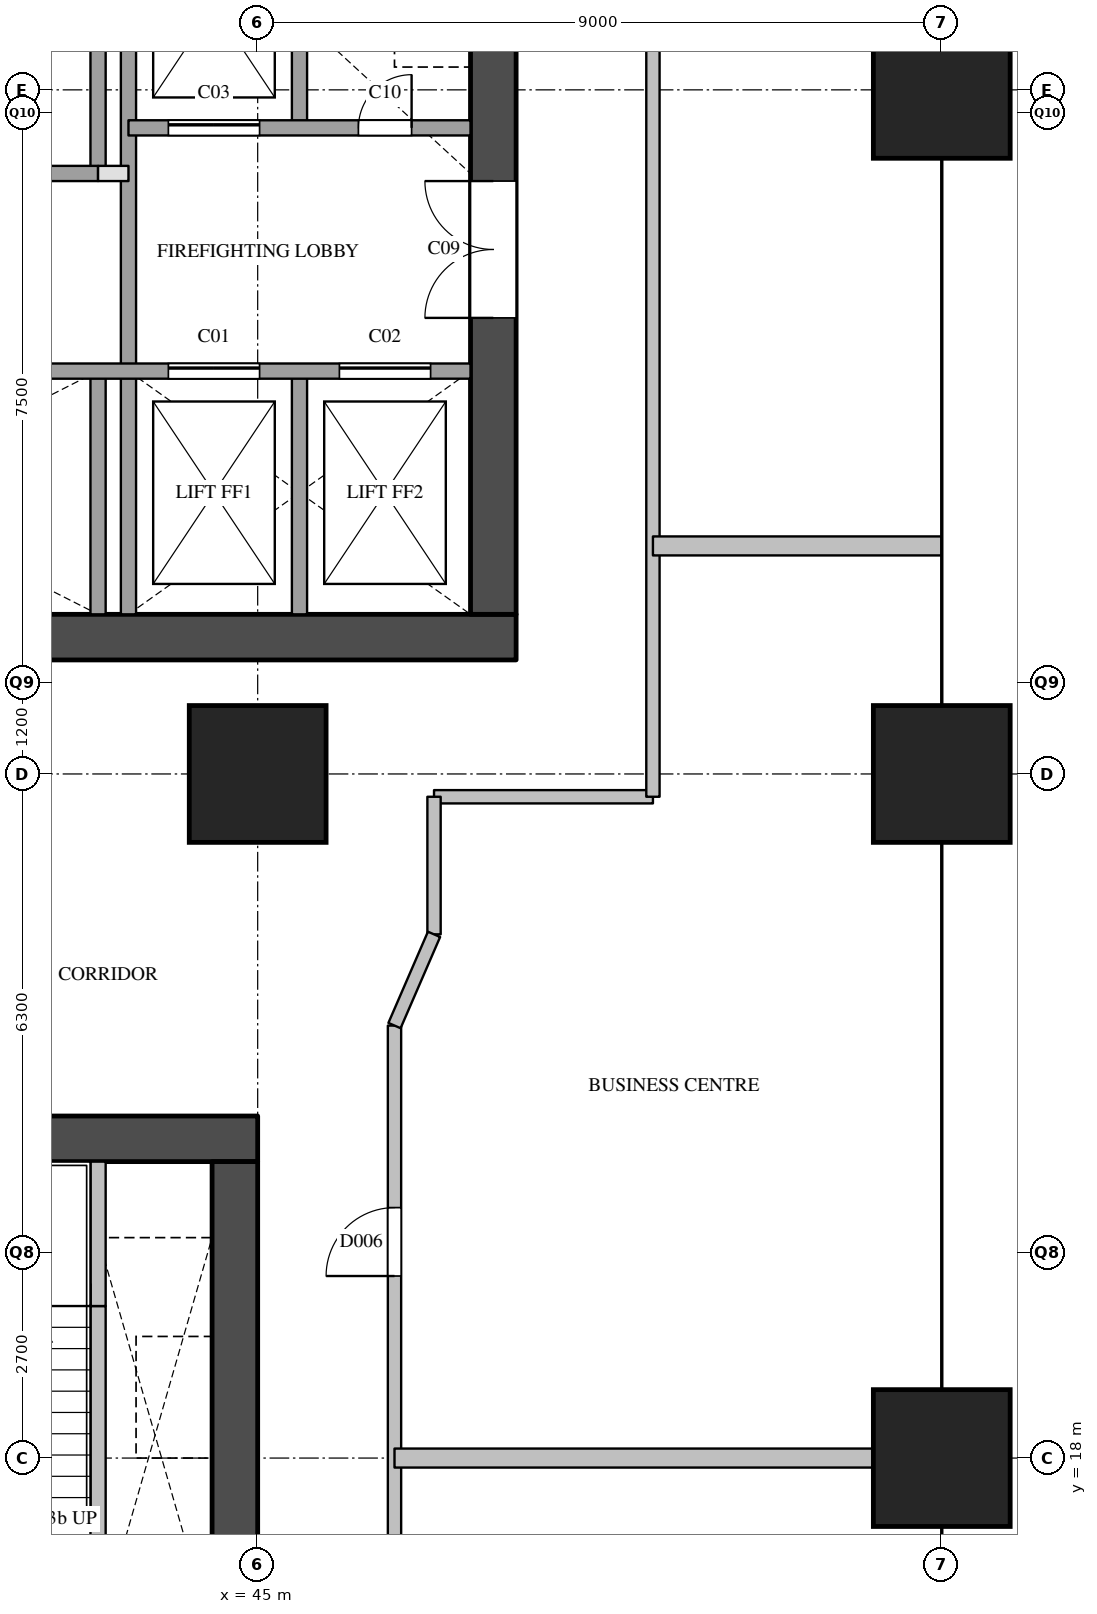
"""IFC4 building model, lengths in metres.
Left out: names, types, materials, properties, quantities, classifications, styles, units other than length and angle.
Written with IfcOpenShell. Run it as: python <this file> out.ifc"""

import sys

from ifc_helpers import new_model, si_unit, direction, frame, frame_2d, origin, origin_2d, place, context, subcontext, project, spatial, rectangle, extrude, element, fill, save


model = new_model("IFC4")
c1 = context("Model", 3, precision=1e-05, world=origin(), true_north=direction((0.0, 1.0)))
c2 = subcontext(c1, "Body", "Model", "MODEL_VIEW")
j1 = project(units=[si_unit("LENGTHUNIT", "METRE"), si_unit("PLANEANGLEUNIT", "RADIAN")], contexts=[c1])
p1 = place(None, origin())
s1 = spatial("IfcSite", under=j1, at=p1, CompositionType="ELEMENT")
p2 = place(p1, origin())
s2 = spatial("IfcBuilding", under=s1, at=p2, CompositionType="ELEMENT")
p3 = place(p2, frame((0.0, 0.0, 77.8)))
s3 = spatial("IfcBuildingStorey", under=s2, at=p3, CompositionType="ELEMENT", Elevation=77.8)
for number, where, z_axis, x_axis in (
    (1, (45.0, 27.0, 0.0), (0.0, 0.0, 1.0), (1.0, 0.0, 0.0)),
    (2, (54.0, 18.0, 0.0), (0.0, 0.0, 1.0), (1.0, 0.0, 0.0)),
    (3, (54.0, 27.0, 0.0), (0.0, 0.0, 1.0), (1.0, 0.0, 0.0)),
    (4, (54.0, 36.0, 0.0), (0.0, 0.0, 1.0), (1.0, 0.0, 0.0)),
):
    element("IfcColumn", number, at=place(p3, frame(where, z_axis=z_axis, x_axis=x_axis)), inside=s3, PredefinedType="COLUMN", context=c2, shape_type="SweptSolid", body=[
        extrude(rectangle(XDim=1.8, YDim=1.8, at=origin_2d()), origin(), (0.0, 0.0, 1.0), 3.8),
    ])
p4 = place(p3, frame((36.0, 28.8, 0.0), z_axis=(0.0, 0.0, 1.0), x_axis=(1.0, 0.0, 0.0)))
e5 = element("IfcWall", 5, at=p4, inside=s3, PredefinedType="SHEAR", context=c2, shape_type="SweptSolid", body=[
    extrude(rectangle(XDim=12.4, YDim=0.6, at=frame_2d((6.2, 0.0))), origin(), (0.0, 0.0, 1.0), 3.5),
])
p5 = place(p3, frame((48.1, 29.1, 0.0), z_axis=(0.0, 0.0, 1.0), x_axis=(0.0, 1.0, 0.0)))
e6 = element("IfcWall", 6, at=p5, inside=s3, PredefinedType="SHEAR", context=c2, shape_type="SweptSolid", body=[
    extrude(rectangle(XDim=20.3, YDim=0.6, at=frame_2d((10.15, 0.0))), origin(), (0.0, 0.0, 1.0), 3.5),
])
p6 = place(p5, frame((12.5, 0.0, 0.0)))
e7 = element("IfcOpeningElement", 7, at=p6, cuts=e6, PredefinedType="OPENING", context=c2, shape_type="SweptSolid", body=[
    extrude(rectangle(XDim=0.7, YDim=2.1, at=frame_2d((0.35, 1.05))), frame((0.0, 0.31, 0.0), z_axis=(0.0, -1.0, 0.0), x_axis=(1.0, 0.0, 0.0)), (0.0, 0.0, 1.0), 0.62),
])
p7 = place(p5, frame((3.9, 0.0, 0.0)))
e8 = element("IfcOpeningElement", 8, at=p7, cuts=e6, PredefinedType="OPENING", context=c2, shape_type="SweptSolid", body=[
    extrude(rectangle(XDim=1.8, YDim=2.1, at=frame_2d((0.9, 1.05))), frame((0.0, 0.31, 0.0), z_axis=(0.0, -1.0, 0.0), x_axis=(1.0, 0.0, 0.0)), (0.0, 0.0, 1.0), 0.62),
])
p8 = place(p3, frame((42.9, 29.1, 0.0), z_axis=(0.0, 0.0, 1.0), x_axis=(0.0, 1.0, 0.0)))
e9 = element("IfcWall", 9, at=p8, inside=s3, PredefinedType="SOLIDWALL", context=c2, shape_type="SweptSolid", body=[
    extrude(rectangle(XDim=3.2, YDim=0.2, at=frame_2d((1.6, 0.0))), origin(), (0.0, 0.0, 1.0), 3.5),
])
p9 = place(p3, frame((42.9, 34.9, 0.0), z_axis=(0.0, 0.0, 1.0), x_axis=(0.0, 1.0, 0.0)))
e10 = element("IfcWall", 10, at=p9, inside=s3, PredefinedType="SOLIDWALL", context=c2, shape_type="SweptSolid", body=[
    extrude(rectangle(XDim=3.2, YDim=0.2, at=frame_2d((1.6, 0.0))), origin(), (0.0, 0.0, 1.0), 3.5),
])
p10 = place(p3, frame((43.3, 29.1, 0.0), z_axis=(0.0, 0.0, 1.0), x_axis=(0.0, 1.0, 0.0)))
e11 = element("IfcWall", 11, at=p10, inside=s3, PredefinedType="SOLIDWALL", context=c2, shape_type="SweptSolid", body=[
    extrude(rectangle(XDim=9.9, YDim=0.2, at=frame_2d((4.95, 0.0))), origin(), (0.0, 0.0, 1.0), 3.5),
])
for number, where, z_axis, x_axis in (
    (12, (45.55, 29.1, 0.0), (0.0, 0.0, 1.0), (0.0, 1.0, 0.0)),
    (13, (45.55, 35.5, 0.0), (0.0, 0.0, 1.0), (0.0, 1.0, 0.0)),
):
    element("IfcWall", number, at=place(p3, frame(where, z_axis=z_axis, x_axis=x_axis)), inside=s3, PredefinedType="SOLIDWALL", context=c2, shape_type="SweptSolid", body=[
        extrude(rectangle(XDim=3.2, YDim=0.2, at=frame_2d((1.6, 0.0))), origin(), (0.0, 0.0, 1.0), 3.5),
    ])
p11 = place(p3, frame((36.6, 32.3, 0.0), z_axis=(0.0, 0.0, 1.0), x_axis=(1.0, 0.0, 0.0)))
e14 = element("IfcWall", 14, at=p11, inside=s3, PredefinedType="SOLIDWALL", context=c2, shape_type="SweptSolid", body=[
    extrude(rectangle(XDim=11.2, YDim=0.2, at=frame_2d((5.6, 0.0))), origin(), (0.0, 0.0, 1.0), 3.5),
])
p12 = place(p11, frame((7.225, 0.0, 0.0)))
e15 = element("IfcOpeningElement", 15, at=p12, cuts=e14, PredefinedType="OPENING", context=c2, shape_type="SweptSolid", body=[
    extrude(rectangle(XDim=1.2, YDim=2.1, at=frame_2d((0.6, 1.05))), frame((0.0, 0.11, 0.0), z_axis=(0.0, -1.0, 0.0), x_axis=(1.0, 0.0, 0.0)), (0.0, 0.0, 1.0), 0.22),
])
p13 = place(p11, frame((9.475, 0.0, 0.0)))
e16 = element("IfcOpeningElement", 16, at=p13, cuts=e14, PredefinedType="OPENING", context=c2, shape_type="SweptSolid", body=[
    extrude(rectangle(XDim=1.2, YDim=2.1, at=frame_2d((0.6, 1.05))), frame((0.0, 0.11, 0.0), z_axis=(0.0, -1.0, 0.0), x_axis=(1.0, 0.0, 0.0)), (0.0, 0.0, 1.0), 0.22),
])
p14 = place(p3, frame((42.9, 34.9, 0.0), z_axis=(0.0, 0.0, 1.0), x_axis=(1.0, 0.0, 0.0)))
e17 = element("IfcWall", 17, at=p14, inside=s3, PredefinedType="PARTITIONING", context=c2, shape_type="SweptSolid", body=[
    extrude(rectangle(XDim=0.4, YDim=0.2, at=frame_2d((0.2, 0.0))), origin(), (0.0, 0.0, 1.0), 3.5),
])
p15 = place(p3, frame((36.6, 34.9, 0.0), z_axis=(0.0, 0.0, 1.0), x_axis=(1.0, 0.0, 0.0)))
e18 = element("IfcWall", 18, at=p15, inside=s3, PredefinedType="SOLIDWALL", context=c2, shape_type="SweptSolid", body=[
    extrude(rectangle(XDim=6.3, YDim=0.2, at=frame_2d((3.15, 0.0))), origin(), (0.0, 0.0, 1.0), 3.5),
])
p16 = place(p3, frame((43.3, 35.5, 0.0), z_axis=(0.0, 0.0, 1.0), x_axis=(1.0, 0.0, 0.0)))
e19 = element("IfcWall", 19, at=p16, inside=s3, PredefinedType="SOLIDWALL", context=c2, shape_type="SweptSolid", body=[
    extrude(rectangle(XDim=4.5, YDim=0.2, at=frame_2d((2.25, 0.0))), origin(), (0.0, 0.0, 1.0), 3.5),
])
p17 = place(p16, frame((0.525, 0.0, 0.0)))
e20 = element("IfcOpeningElement", 20, at=p17, cuts=e19, PredefinedType="OPENING", context=c2, shape_type="SweptSolid", body=[
    extrude(rectangle(XDim=1.2, YDim=2.1, at=frame_2d((0.6, 1.05))), frame((0.0, 0.11, 0.0), z_axis=(0.0, -1.0, 0.0), x_axis=(1.0, 0.0, 0.0)), (0.0, 0.0, 1.0), 0.22),
])
p18 = place(p16, frame((3.025, 0.0, 0.0)))
e21 = element("IfcOpeningElement", 21, at=p18, cuts=e19, PredefinedType="OPENING", context=c2, shape_type="SweptSolid", body=[
    extrude(rectangle(XDim=0.7, YDim=2.1, at=frame_2d((0.35, 1.05))), frame((0.0, 0.11, 0.0), z_axis=(0.0, -1.0, 0.0), x_axis=(1.0, 0.0, 0.0)), (0.0, 0.0, 1.0), 0.22),
])
p19 = place(p3, frame((36.0, 22.2, 0.0), z_axis=(0.0, 0.0, 1.0), x_axis=(1.0, 0.0, 0.0)))
e22 = element("IfcWall", 22, at=p19, inside=s3, PredefinedType="SHEAR", context=c2, shape_type="SweptSolid", body=[
    extrude(rectangle(XDim=9.0, YDim=0.6, at=frame_2d((4.5, 0.0))), origin(), (0.0, 0.0, 1.0), 3.5),
])
p20 = place(p3, frame((44.7, 9.6, 0.0), z_axis=(0.0, 0.0, 1.0), x_axis=(0.0, 1.0, 0.0)))
e23 = element("IfcWall", 23, at=p20, inside=s3, PredefinedType="SHEAR", context=c2, shape_type="SweptSolid", body=[
    extrude(rectangle(XDim=12.3, YDim=0.6, at=frame_2d((6.15, 0.0))), origin(), (0.0, 0.0, 1.0), 3.5),
])
p21 = place(p20, frame((0.8, 0.0, 0.0)))
e24 = element("IfcOpeningElement", 24, at=p21, cuts=e23, PredefinedType="OPENING", context=c2, shape_type="SweptSolid", body=[
    extrude(rectangle(XDim=0.7, YDim=2.1, at=frame_2d((0.35, 1.05))), frame((0.0, 0.31, 0.0), z_axis=(0.0, -1.0, 0.0), x_axis=(1.0, 0.0, 0.0)), (0.0, 0.0, 1.0), 0.62),
])
p22 = place(p3, frame((42.9, 15.7, 0.0), z_axis=(0.0, 0.0, 1.0), x_axis=(0.0, 1.0, 0.0)))
e25 = element("IfcWall", 25, at=p22, inside=s3, PredefinedType="SOLIDWALL", context=c2, shape_type="SweptSolid", body=[
    extrude(rectangle(XDim=4.3, YDim=0.2, at=frame_2d((2.15, 0.0))), origin(), (0.0, 0.0, 1.0), 3.5),
])
p23 = place(p3, frame((42.9, 20.0, 0.0), z_axis=(0.0, 0.0, 1.0), x_axis=(0.0, 1.0, 0.0)))
e26 = element("IfcWall", 26, at=p23, inside=s3, PredefinedType="SOLIDWALL", context=c2, shape_type="SweptSolid", body=[
    extrude(rectangle(XDim=1.9, YDim=0.2, at=frame_2d((0.95, 0.0))), origin(), (0.0, 0.0, 1.0), 3.5),
])
p24 = place(p3, frame((47.32, 26.7, 0.0), z_axis=(0.0, 0.0, 1.0), x_axis=(1.0, 0.0, 0.0)))
e27 = element("IfcWall", 27, at=p24, inside=s3, PredefinedType="PARTITIONING", context=c2, shape_type="SweptSolid", body=[
    extrude(rectangle(XDim=2.88, YDim=0.175, at=frame_2d((1.44, 0.0))), origin(), (0.0, 0.0, 1.0), 2.5),
])
p25 = place(p3, frame((46.8, 7.2, 0.0), z_axis=(0.0, 0.0, 1.0), x_axis=(0.0, 1.0, 0.0)))
e28 = element("IfcWall", 28, at=p25, inside=s3, PredefinedType="PARTITIONING", context=c2, shape_type="SweptSolid", body=[
    extrude(rectangle(XDim=16.49, YDim=0.175, at=frame_2d((8.245, 0.0))), origin(), (0.0, 0.0, 1.0), 3.5),
])
p26 = place(p25, frame((4.95, 0.0, 0.0)))
e29 = element("IfcOpeningElement", 29, at=p26, cuts=e28, PredefinedType="OPENING", context=c2, shape_type="SweptSolid", body=[
    extrude(rectangle(XDim=0.9, YDim=2.1, at=frame_2d((0.45, 1.05))), frame((0.0, 0.097, 0.0), z_axis=(0.0, -1.0, 0.0), x_axis=(1.0, 0.0, 0.0)), (0.0, 0.0, 1.0), 0.195),
])
p27 = place(p25, frame((13.195, 0.0, 0.0)))
e30 = element("IfcOpeningElement", 30, at=p27, cuts=e28, PredefinedType="OPENING", context=c2, shape_type="SweptSolid", body=[
    extrude(rectangle(XDim=0.9, YDim=2.1, at=frame_2d((0.45, 1.05))), frame((0.0, 0.097, 0.0), z_axis=(0.0, -1.0, 0.0), x_axis=(1.0, 0.0, 0.0)), (0.0, 0.0, 1.0), 0.195),
])
p28 = place(p3, frame((47.32, 24.89, 0.0), z_axis=(0.0, 0.0, 1.0), x_axis=(0.0, 1.0, 0.0)))
e31 = element("IfcWall", 31, at=p28, inside=s3, PredefinedType="PARTITIONING", context=c2, shape_type="SweptSolid", body=[
    extrude(rectangle(XDim=1.81, YDim=0.175, at=frame_2d((0.905, 0.0))), origin(), (0.0, 0.0, 1.0), 2.5),
])
p29 = place(p3, frame((50.2, 26.7, 0.0), z_axis=(0.0, 0.0, 1.0), x_axis=(0.0, 1.0, 0.0)))
e32 = element("IfcWall", 32, at=p29, inside=s3, PredefinedType="PARTITIONING", context=c2, shape_type="SweptSolid", body=[
    extrude(rectangle(XDim=25.1, YDim=0.175, at=frame_2d((12.55, 0.0))), origin(), (0.0, 0.0, 1.0), 2.5),
])
p30 = place(p29, frame((10.076, 0.0, 0.0)))
e33 = element("IfcOpeningElement", 33, at=p30, cuts=e32, PredefinedType="OPENING", context=c2, shape_type="SweptSolid", body=[
    extrude(rectangle(XDim=0.9, YDim=2.1, at=frame_2d((0.45, 1.05))), frame((0.0, 0.097, 0.0), z_axis=(0.0, -1.0, 0.0), x_axis=(1.0, 0.0, 0.0)), (0.0, 0.0, 1.0), 0.195),
])
p31 = place(p29, frame((20.976, 0.0, 0.0)))
e34 = element("IfcOpeningElement", 34, at=p31, cuts=e32, PredefinedType="OPENING", context=c2, shape_type="SweptSolid", body=[
    extrude(rectangle(XDim=0.9, YDim=2.1, at=frame_2d((0.45, 1.05))), frame((0.0, 0.097, 0.0), z_axis=(0.0, -1.0, 0.0), x_axis=(1.0, 0.0, 0.0)), (0.0, 0.0, 1.0), 0.195),
])
p32 = place(p3, frame((46.8, 18.0, 0.0), z_axis=(0.0, 0.0, 1.0), x_axis=(1.0, 0.0, 0.0)))
e35 = element("IfcWall", 35, at=p32, inside=s3, PredefinedType="PARTITIONING", context=c2, shape_type="SweptSolid", body=[
    extrude(rectangle(XDim=7.2, YDim=0.25, at=frame_2d((3.6, 0.0))), origin(), (0.0, 0.0, 1.0), 3.5),
])
p33 = place(p3, frame((50.2, 30.0, 0.0), z_axis=(0.0, 0.0, 1.0), x_axis=(1.0, 0.0, 0.0)))
e36 = element("IfcWall", 36, at=p33, inside=s3, PredefinedType="PARTITIONING", context=c2, shape_type="SweptSolid", body=[
    extrude(rectangle(XDim=3.8, YDim=0.25, at=frame_2d((1.9, 0.0))), origin(), (0.0, 0.0, 1.0), 2.5),
])
p34 = place(p3, frame((47.32, 24.89, 0.0), z_axis=(0.0, 0.0, 1.0), x_axis=(-0.397633632391, -0.917544273804, 0.0)))
e37 = element("IfcWall", 37, at=p34, inside=s3, PredefinedType="PARTITIONING", context=c2, shape_type="SweptSolid", body=[
    extrude(rectangle(XDim=1.308, YDim=0.175, at=frame_2d((0.654, 0.0))), origin(), (0.0, 0.0, 1.0), 3.5),
])
p35 = place(p12, origin())
e38 = element("IfcDoor", 38, at=p35, inside=s3, OperationType="SLIDING_TO_LEFT", PredefinedType="DOOR", context=c2, shape_type="SweptSolid", body=[
    extrude(rectangle(XDim=1.2, YDim=2.1, at=frame_2d((0.6, 1.05))), frame((0.0, 0.025, 0.0), z_axis=(0.0, -1.0, 0.0), x_axis=(1.0, 0.0, 0.0)), (0.0, 0.0, 1.0), 0.05),
])
fill(e15, e38)
p36 = place(p13, origin())
e39 = element("IfcDoor", 39, at=p36, inside=s3, OperationType="SLIDING_TO_LEFT", PredefinedType="DOOR", context=c2, shape_type="SweptSolid", body=[
    extrude(rectangle(XDim=1.2, YDim=2.1, at=frame_2d((0.6, 1.05))), frame((0.0, 0.025, 0.0), z_axis=(0.0, -1.0, 0.0), x_axis=(1.0, 0.0, 0.0)), (0.0, 0.0, 1.0), 0.05),
])
fill(e16, e39)
p37 = place(p17, origin())
e40 = element("IfcDoor", 40, at=p37, inside=s3, OperationType="SLIDING_TO_LEFT", PredefinedType="DOOR", context=c2, shape_type="SweptSolid", body=[
    extrude(rectangle(XDim=1.2, YDim=2.1, at=frame_2d((0.6, 1.05))), frame((0.0, 0.025, 0.0), z_axis=(0.0, -1.0, 0.0), x_axis=(1.0, 0.0, 0.0)), (0.0, 0.0, 1.0), 0.05),
])
fill(e20, e40)
p38 = place(p7, origin())
e41 = element("IfcDoor", 41, at=p38, inside=s3, OperationType="DOUBLE_DOOR_SINGLE_SWING", PredefinedType="DOOR", context=c2, shape_type="SweptSolid", body=[
    extrude(rectangle(XDim=1.8, YDim=2.1, at=frame_2d((0.9, 1.05))), frame((0.0, 0.025, 0.0), z_axis=(0.0, -1.0, 0.0), x_axis=(1.0, 0.0, 0.0)), (0.0, 0.0, 1.0), 0.05),
])
fill(e8, e41)
p39 = place(p18, origin())
e42 = element("IfcDoor", 42, at=p39, inside=s3, OperationType="SINGLE_SWING_RIGHT", PredefinedType="DOOR", context=c2, shape_type="SweptSolid", body=[
    extrude(rectangle(XDim=0.7, YDim=2.1, at=frame_2d((0.35, 1.05))), frame((0.0, 0.025, 0.0), z_axis=(0.0, -1.0, 0.0), x_axis=(1.0, 0.0, 0.0)), (0.0, 0.0, 1.0), 0.05),
])
fill(e21, e42)
p40 = place(p27, origin())
e43 = element("IfcDoor", 43, at=p40, inside=s3, OperationType="SINGLE_SWING_LEFT", PredefinedType="DOOR", context=c2, shape_type="SweptSolid", body=[
    extrude(rectangle(XDim=0.9, YDim=2.1, at=frame_2d((0.45, 1.05))), frame((0.0, 0.025, 0.0), z_axis=(0.0, -1.0, 0.0), x_axis=(1.0, 0.0, 0.0)), (0.0, 0.0, 1.0), 0.05),
])
fill(e30, e43)
save(model, sys.argv[1])
